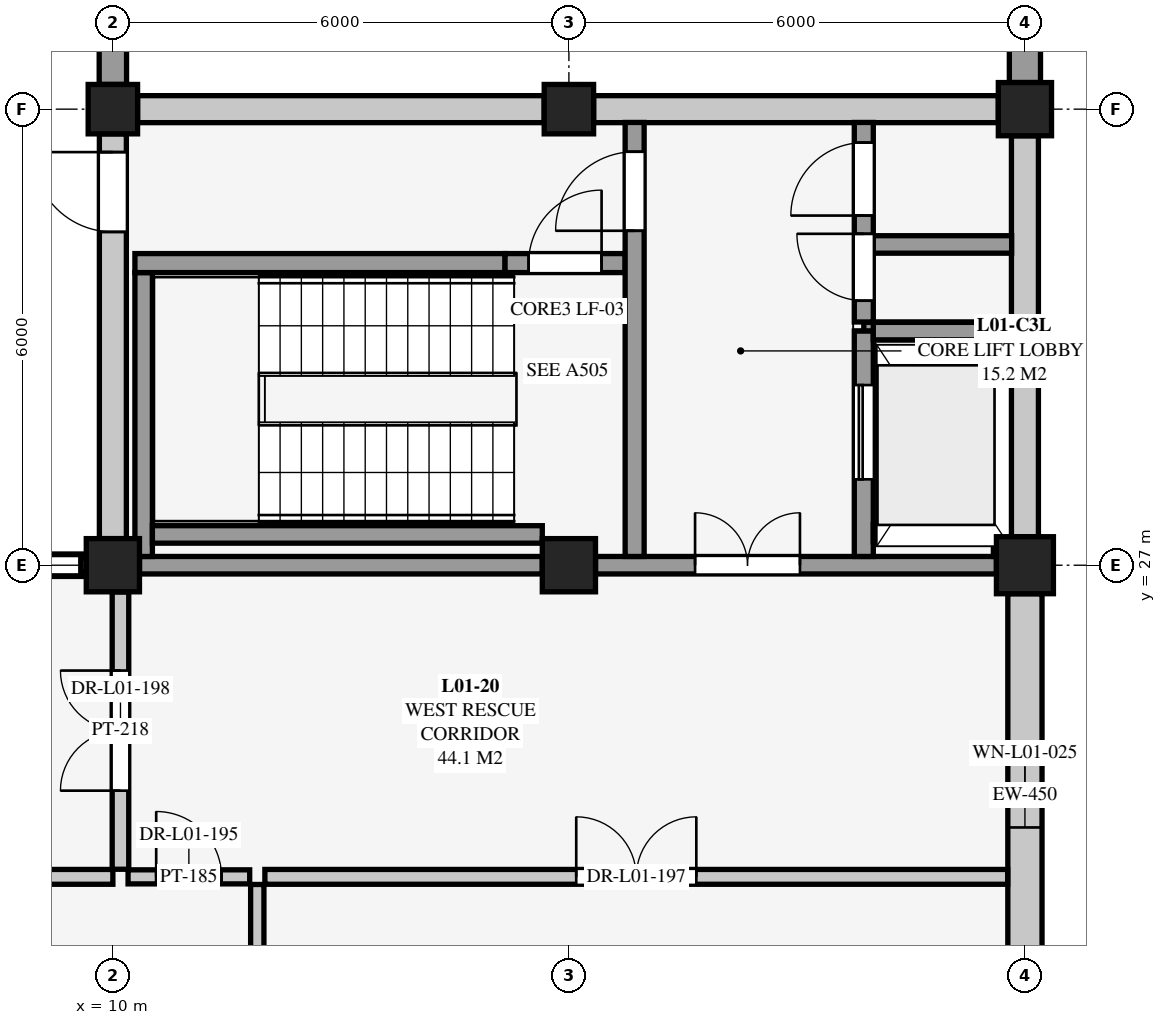
"""IFC4 building model, lengths in metres.
Left out: names, types, materials, properties, quantities, classifications, styles, units other than length and angle.
Written with IfcOpenShell. Run it as: python <this file> out.ifc"""

import sys

from ifc_helpers import new_model, si_unit, direction, frame, frame_2d, origin, origin_2d, place, context, subcontext, project, spatial, rectangle, extrude, element, fill, save


model = new_model("IFC4")
c1 = context("Model", 3, precision=1e-05, world=origin(), true_north=direction((0.0, 1.0)))
c2 = subcontext(c1, "Body", "Model", "MODEL_VIEW")
j1 = project(units=[si_unit("LENGTHUNIT", "METRE"), si_unit("PLANEANGLEUNIT", "RADIAN")], contexts=[c1])
p1 = place(None, origin())
s1 = spatial("IfcSite", under=j1, at=p1, CompositionType="ELEMENT")
p2 = place(p1, origin())
s2 = spatial("IfcBuilding", under=s1, at=p2, CompositionType="ELEMENT")
p3 = place(p2, origin())
s3 = spatial("IfcBuildingStorey", under=s2, at=p3, CompositionType="ELEMENT", Elevation=0.0)
p4 = place(p3, frame((10.0, 27.0, 0.0), z_axis=(0.0, 0.0, 1.0), x_axis=(1.0, 0.0, 0.0)))
e1 = element("IfcColumn", 1, at=p4, inside=s3, PredefinedType="COLUMN", context=c2, shape_type="SweptSolid", body=[
    extrude(rectangle(XDim=0.7, YDim=0.7, at=origin_2d()), origin(), (0.0, 0.0, 1.0), 4.5),
])
p5 = place(p3, frame((10.0, 33.0, 0.0), z_axis=(0.0, 0.0, 1.0), x_axis=(1.0, 0.0, 0.0)))
e2 = element("IfcColumn", 2, at=p5, inside=s3, PredefinedType="COLUMN", context=c2, shape_type="SweptSolid", body=[
    extrude(rectangle(XDim=0.65, YDim=0.65, at=origin_2d()), origin(), (0.0, 0.0, 1.0), 4.5),
])
p6 = place(p3, frame((16.0, 27.0, 0.0), z_axis=(0.0, 0.0, 1.0), x_axis=(1.0, 0.0, 0.0)))
e3 = element("IfcColumn", 3, at=p6, inside=s3, PredefinedType="COLUMN", context=c2, shape_type="SweptSolid", body=[
    extrude(rectangle(XDim=0.7, YDim=0.7, at=origin_2d()), origin(), (0.0, 0.0, 1.0), 4.5),
])
p7 = place(p3, frame((16.0, 33.0, 0.0), z_axis=(0.0, 0.0, 1.0), x_axis=(1.0, 0.0, 0.0)))
e4 = element("IfcColumn", 4, at=p7, inside=s3, PredefinedType="COLUMN", context=c2, shape_type="SweptSolid", body=[
    extrude(rectangle(XDim=0.65, YDim=0.65, at=origin_2d()), origin(), (0.0, 0.0, 1.0), 4.5),
])
p8 = place(p3, frame((22.0, 27.0, 0.0), z_axis=(0.0, 0.0, 1.0), x_axis=(1.0, 0.0, 0.0)))
e5 = element("IfcColumn", 5, at=p8, inside=s3, PredefinedType="COLUMN", context=c2, shape_type="SweptSolid", body=[
    extrude(rectangle(XDim=0.75, YDim=0.75, at=origin_2d()), origin(), (0.0, 0.0, 1.0), 4.5),
])
p9 = place(p3, frame((22.0, 33.0, 0.0), z_axis=(0.0, 0.0, 1.0), x_axis=(1.0, 0.0, 0.0)))
e6 = element("IfcColumn", 6, at=p9, inside=s3, PredefinedType="COLUMN", context=c2, shape_type="SweptSolid", body=[
    extrude(rectangle(XDim=0.7, YDim=0.7, at=origin_2d()), origin(), (0.0, 0.0, 1.0), 4.5),
])
p10 = place(p3, frame((10.0, 33.325, 0.0), z_axis=(0.0, 0.0, 1.0), x_axis=(0.0, 1.0, 0.0)))
e7 = element("IfcWall", 7, at=p10, inside=s3, PredefinedType="USERDEFINED", context=c2, shape_type="SweptSolid", body=[
    extrude(rectangle(XDim=5.275, YDim=0.36, at=frame_2d((2.638, 0.0))), origin(), (0.0, 0.0, 1.0), 4.5),
])
p11 = place(p3, frame((22.0, 33.35, 0.0), z_axis=(0.0, 0.0, 1.0), x_axis=(0.0, 1.0, 0.0)))
e8 = element("IfcWall", 8, at=p11, inside=s3, PredefinedType="USERDEFINED", context=c2, shape_type="SweptSolid", body=[
    extrude(rectangle(XDim=5.325, YDim=0.41, at=frame_2d((2.663, 0.0))), origin(), (0.0, 0.0, 1.0), 4.5),
])
p12 = place(p3, frame((4.4, 27.0, 0.0), z_axis=(0.0, 0.0, 1.0), x_axis=(1.0, 0.0, 0.0)))
e9 = element("IfcWall", 9, at=p12, inside=s3, PredefinedType="SOLIDWALL", context=c2, shape_type="SweptSolid", body=[
    extrude(rectangle(XDim=5.25, YDim=0.295, at=frame_2d((2.625, 0.0))), origin(), (0.0, 0.0, 1.0), 0.46),
])
p13 = place(p3, frame((22.0, 26.625, 0.0), z_axis=(0.0, 0.0, 1.0), x_axis=(0.0, -1.0, 0.0)))
e10 = element("IfcWall", 10, at=p13, inside=s3, PredefinedType="SOLIDWALL", context=c2, shape_type="SweptSolid", body=[
    extrude(rectangle(XDim=5.3, YDim=0.45, at=frame_2d((2.65, 0.0))), origin(), (0.0, 0.0, 1.0), 3.797),
])
p14 = place(p13, frame((2.225, 0.0, 0.9)))
e11 = element("IfcOpeningElement", 11, at=p14, cuts=e10, PredefinedType="OPENING", context=c2, shape_type="SweptSolid", body=[
    extrude(rectangle(XDim=0.85, YDim=1.95, at=frame_2d((0.425, 0.975))), frame((0.0, 0.235, 0.0), z_axis=(0.0, -1.0, 0.0), x_axis=(1.0, 0.0, 0.0)), (0.0, 0.0, 1.0), 0.47),
])
p15 = place(p3, frame((10.325, 33.0, 0.0), z_axis=(0.0, 0.0, 1.0), x_axis=(1.0, 0.0, 0.0)))
e12 = element("IfcWall", 12, at=p15, inside=s3, PredefinedType="SOLIDWALL", context=c2, shape_type="SweptSolid", body=[
    extrude(rectangle(XDim=5.35, YDim=0.355, at=frame_2d((2.675, 0.0))), origin(), (0.0, 0.0, 1.0), 3.918),
])
p16 = place(p3, frame((16.325, 33.0, 0.0), z_axis=(0.0, 0.0, 1.0), x_axis=(1.0, 0.0, 0.0)))
e13 = element("IfcWall", 13, at=p16, inside=s3, PredefinedType="SOLIDWALL", context=c2, shape_type="SweptSolid", body=[
    extrude(rectangle(XDim=5.325, YDim=0.355, at=frame_2d((2.663, 0.0))), origin(), (0.0, 0.0, 1.0), 3.757),
])
p17 = place(p3, frame((10.0, 27.35, 0.0), z_axis=(0.0, 0.0, 1.0), x_axis=(0.0, 1.0, 0.0)))
e14 = element("IfcWall", 14, at=p17, inside=s3, PredefinedType="SOLIDWALL", context=c2, shape_type="SweptSolid", body=[
    extrude(rectangle(XDim=5.325, YDim=0.355, at=frame_2d((2.663, 0.0))), origin(), (0.0, 0.0, 1.0), 3.763),
])
p18 = place(p17, frame((4.035, 0.0, 0.0)))
e15 = element("IfcOpeningElement", 15, at=p18, cuts=e14, PredefinedType="OPENING", context=c2, shape_type="SweptSolid", body=[
    extrude(rectangle(XDim=1.05, YDim=2.14, at=frame_2d((0.525, 1.07))), frame((0.0, 0.188, 0.0), z_axis=(0.0, -1.0, 0.0), x_axis=(1.0, 0.0, 0.0)), (0.0, 0.0, 1.0), 0.375),
])
p19 = place(p3, frame((22.0, 32.65, 0.0), z_axis=(0.0, 0.0, 1.0), x_axis=(0.0, -1.0, 0.0)))
e16 = element("IfcWall", 16, at=p19, inside=s3, PredefinedType="SOLIDWALL", context=c2, shape_type="SweptSolid", body=[
    extrude(rectangle(XDim=5.275, YDim=0.355, at=frame_2d((2.637, 0.0))), origin(), (0.0, 0.0, 1.0), 3.763),
])
p20 = place(p3, frame((19.88, 27.42, -1.05), z_axis=(0.0, 0.0, 1.0), x_axis=(1.0, 0.0, 0.0)))
e17 = element("IfcWall", 17, at=p20, inside=s3, PredefinedType="SHEAR", context=c2, shape_type="SweptSolid", body=[
    extrude(rectangle(XDim=1.82, YDim=0.23, at=frame_2d((0.91, 0.0))), origin(), (0.0, 0.0, 1.0), 1.05),
])
p21 = place(p3, frame((21.7, 27.42, -1.05), z_axis=(0.0, 0.0, 1.0), x_axis=(0.0, 1.0, 0.0)))
e18 = element("IfcWall", 18, at=p21, inside=s3, PredefinedType="SHEAR", context=c2, shape_type="SweptSolid", body=[
    extrude(rectangle(XDim=2.66, YDim=0.23, at=frame_2d((1.33, 0.0))), origin(), (0.0, 0.0, 1.0), 1.05),
])
p22 = place(p3, frame((21.7, 30.08, -1.05), z_axis=(0.0, 0.0, 1.0), x_axis=(-1.0, 0.0, 0.0)))
e19 = element("IfcWall", 19, at=p22, inside=s3, PredefinedType="SHEAR", context=c2, shape_type="SweptSolid", body=[
    extrude(rectangle(XDim=1.82, YDim=0.23, at=frame_2d((0.91, 0.0))), origin(), (0.0, 0.0, 1.0), 1.05),
])
p23 = place(p3, frame((19.88, 30.08, -1.05), z_axis=(0.0, 0.0, 1.0), x_axis=(0.0, -1.0, 0.0)))
e20 = element("IfcWall", 20, at=p23, inside=s3, PredefinedType="SHEAR", context=c2, shape_type="SweptSolid", body=[
    extrude(rectangle(XDim=2.66, YDim=0.23, at=frame_2d((1.33, 0.0))), origin(), (0.0, 0.0, 1.0), 1.05),
])
p24 = place(p3, frame((10.35, 27.0, 0.0), z_axis=(0.0, 0.0, 1.0), x_axis=(1.0, 0.0, 0.0)))
e21 = element("IfcWall", 21, at=p24, inside=s3, PredefinedType="SHEAR", context=c2, shape_type="SweptSolid", body=[
    extrude(rectangle(XDim=5.3, YDim=0.23, at=frame_2d((2.65, 0.0))), origin(), (0.0, 0.0, 1.0), 4.204),
])
p25 = place(p3, frame((16.35, 27.0, 0.0), z_axis=(0.0, 0.0, 1.0), x_axis=(1.0, 0.0, 0.0)))
e22 = element("IfcWall", 22, at=p25, inside=s3, PredefinedType="SHEAR", context=c2, shape_type="SweptSolid", body=[
    extrude(rectangle(XDim=5.275, YDim=0.23, at=frame_2d((2.637, 0.0))), origin(), (0.0, 0.0, 1.0), 4.204),
])
p26 = place(p25, frame((1.31, 0.0, 0.0)))
e23 = element("IfcOpeningElement", 23, at=p26, cuts=e22, PredefinedType="OPENING", context=c2, shape_type="SweptSolid", body=[
    extrude(rectangle(XDim=1.38, YDim=2.16, at=frame_2d((0.69, 1.08))), frame((0.0, 0.125, 0.0), z_axis=(0.0, -1.0, 0.0), x_axis=(1.0, 0.0, 0.0)), (0.0, 0.0, 1.0), 0.25),
])
p27 = place(p3, frame((10.405, 27.115, 0.0), z_axis=(0.0, 0.0, 1.0), x_axis=(0.0, 1.0, 0.0)))
e24 = element("IfcWall", 24, at=p27, inside=s3, PredefinedType="SHEAR", context=c2, shape_type="SweptSolid", body=[
    extrude(rectangle(XDim=3.735, YDim=0.23, at=frame_2d((1.868, 0.0))), origin(), (0.0, 0.0, 1.0), 4.5),
])
p28 = place(p3, frame((10.52, 27.405, 0.0), z_axis=(0.0, 0.0, 1.0), x_axis=(1.0, 0.0, 0.0)))
e25 = element("IfcWall", 25, at=p28, inside=s3, PredefinedType="SHEAR", context=c2, shape_type="SweptSolid", body=[
    extrude(rectangle(XDim=5.13, YDim=0.23, at=frame_2d((2.565, 0.0))), origin(), (0.0, 0.0, 1.0), 4.5),
])
p29 = place(p3, frame((10.29, 30.975, 0.0), z_axis=(0.0, 0.0, 1.0), x_axis=(1.0, 0.0, 0.0)))
e26 = element("IfcWall", 26, at=p29, inside=s3, PredefinedType="SHEAR", context=c2, shape_type="SweptSolid", body=[
    extrude(rectangle(XDim=4.87, YDim=0.25, at=frame_2d((2.435, 0.0))), origin(), (0.0, 0.0, 1.0), 4.5),
])
p30 = place(p3, frame((15.16, 30.975, 0.0), z_axis=(0.0, 0.0, 1.0), x_axis=(1.0, 0.0, 0.0)))
e27 = element("IfcWall", 27, at=p30, inside=s3, PredefinedType="SHEAR", context=c2, shape_type="SweptSolid", body=[
    extrude(rectangle(XDim=1.58, YDim=0.25, at=frame_2d((0.79, 0.0))), origin(), (0.0, 0.0, 1.0), 4.204),
])
p31 = place(p30, frame((0.31, 0.0, 0.0)))
e28 = element("IfcOpeningElement", 28, at=p31, cuts=e27, PredefinedType="OPENING", context=c2, shape_type="SweptSolid", body=[
    extrude(rectangle(XDim=0.96, YDim=2.12, at=frame_2d((0.48, 1.06))), frame((0.0, 0.135, 0.0), z_axis=(0.0, -1.0, 0.0), x_axis=(1.0, 0.0, 0.0)), (0.0, 0.0, 1.0), 0.27),
])
p32 = place(p3, frame((16.865, 27.115, 0.0), z_axis=(0.0, 0.0, 1.0), x_axis=(0.0, 1.0, 0.0)))
e29 = element("IfcWall", 29, at=p32, inside=s3, PredefinedType="SHEAR", context=c2, shape_type="SweptSolid", body=[
    extrude(rectangle(XDim=5.71, YDim=0.25, at=frame_2d((2.855, 0.0))), origin(), (0.0, 0.0, 1.0), 4.204),
])
p33 = place(p32, frame((4.285, 0.0, 0.0)))
e30 = element("IfcOpeningElement", 30, at=p33, cuts=e29, PredefinedType="OPENING", context=c2, shape_type="SweptSolid", body=[
    extrude(rectangle(XDim=1.04, YDim=2.14, at=frame_2d((0.52, 1.07))), frame((0.0, 0.135, 0.0), z_axis=(0.0, -1.0, 0.0), x_axis=(1.0, 0.0, 0.0)), (0.0, 0.0, 1.0), 0.27),
])
p34 = place(p3, frame((19.88, 27.115, 0.0), z_axis=(0.0, 0.0, 1.0), x_axis=(0.0, 1.0, 0.0)))
e31 = element("IfcWall", 31, at=p34, inside=s3, PredefinedType="SHEAR", context=c2, shape_type="SweptSolid", body=[
    extrude(rectangle(XDim=2.965, YDim=0.25, at=frame_2d((1.482, 0.0))), origin(), (0.0, 0.0, 1.0), 4.5),
])
p35 = place(p34, frame((1.015, 0.0, 0.0)))
e32 = element("IfcOpeningElement", 32, at=p35, cuts=e31, PredefinedType="OPENING", context=c2, shape_type="SweptSolid", body=[
    extrude(rectangle(XDim=1.24, YDim=2.2, at=frame_2d((0.62, 1.1))), frame((0.0, 0.135, 0.0), z_axis=(0.0, -1.0, 0.0), x_axis=(1.0, 0.0, 0.0)), (0.0, 0.0, 1.0), 0.27),
])
p36 = place(p3, frame((20.005, 27.42, 0.0), z_axis=(0.0, 0.0, 1.0), x_axis=(1.0, 0.0, 0.0)))
e33 = element("IfcWall", 33, at=p36, inside=s3, PredefinedType="SHEAR", context=c2, shape_type="SweptSolid", body=[
    extrude(rectangle(XDim=1.58, YDim=0.23, at=frame_2d((0.79, 0.0))), origin(), (0.0, 0.0, 1.0), 4.5),
])
p37 = place(p3, frame((21.7, 27.115, 0.0), z_axis=(0.0, 0.0, 1.0), x_axis=(0.0, 1.0, 0.0)))
e34 = element("IfcWall", 34, at=p37, inside=s3, PredefinedType="SHEAR", context=c2, shape_type="SweptSolid", body=[
    extrude(rectangle(XDim=2.965, YDim=0.23, at=frame_2d((1.482, 0.0))), origin(), (0.0, 0.0, 1.0), 4.5),
])
p38 = place(p3, frame((20.005, 30.08, 0.0), z_axis=(0.0, 0.0, 1.0), x_axis=(1.0, 0.0, 0.0)))
e35 = element("IfcWall", 35, at=p38, inside=s3, PredefinedType="SHEAR", context=c2, shape_type="SweptSolid", body=[
    extrude(rectangle(XDim=1.58, YDim=0.23, at=frame_2d((0.79, 0.0))), origin(), (0.0, 0.0, 1.0), 4.5),
])
p39 = place(p3, frame((19.88, 30.2, 0.0), z_axis=(0.0, 0.0, 1.0), x_axis=(0.0, 1.0, 0.0)))
e36 = element("IfcWall", 36, at=p39, inside=s3, PredefinedType="SHEAR", context=c2, shape_type="SweptSolid", body=[
    extrude(rectangle(XDim=2.625, YDim=0.25, at=frame_2d((1.312, 0.0))), origin(), (0.0, 0.0, 1.0), 4.204),
])
p40 = place(p39, frame((0.28, 0.0, 0.0)))
e37 = element("IfcOpeningElement", 37, at=p40, cuts=e36, PredefinedType="OPENING", context=c2, shape_type="SweptSolid", body=[
    extrude(rectangle(XDim=0.88, YDim=2.08, at=frame_2d((0.44, 1.04))), frame((0.0, 0.135, 0.0), z_axis=(0.0, -1.0, 0.0), x_axis=(1.0, 0.0, 0.0)), (0.0, 0.0, 1.0), 0.27),
])
p41 = place(p39, frame((1.4, 0.0, 0.0)))
e38 = element("IfcOpeningElement", 38, at=p41, cuts=e36, PredefinedType="OPENING", context=c2, shape_type="SweptSolid", body=[
    extrude(rectangle(XDim=0.96, YDim=2.12, at=frame_2d((0.48, 1.06))), frame((0.0, 0.135, 0.0), z_axis=(0.0, -1.0, 0.0), x_axis=(1.0, 0.0, 0.0)), (0.0, 0.0, 1.0), 0.27),
])
p42 = place(p3, frame((20.005, 31.22, 0.0), z_axis=(0.0, 0.0, 1.0), x_axis=(1.0, 0.0, 0.0)))
e39 = element("IfcWall", 39, at=p42, inside=s3, PredefinedType="SHEAR", context=c2, shape_type="SweptSolid", body=[
    extrude(rectangle(XDim=1.82, YDim=0.23, at=frame_2d((0.91, 0.0))), origin(), (0.0, 0.0, 1.0), 4.204),
])
p43 = place(p3, frame((11.9, 15.187, 0.0), z_axis=(0.0, 0.0, 1.0), x_axis=(0.0, 1.0, 0.0)))
e40 = element("IfcWall", 40, at=p43, inside=s3, PredefinedType="PARTITIONING", context=c2, shape_type="SweptSolid", body=[
    extrude(rectangle(XDim=7.613, YDim=0.175, at=frame_2d((3.807, 0.0))), origin(), (0.0, 0.0, 1.0), 4.216),
])
p44 = place(p43, frame((3.187, 0.0, 0.0)))
e41 = element("IfcOpeningElement", 41, at=p44, cuts=e40, PredefinedType="OPENING", context=c2, shape_type="SweptSolid", body=[
    extrude(rectangle(XDim=1.24, YDim=2.22, at=frame_2d((0.62, 1.11))), frame((0.0, 0.097, 0.0), z_axis=(0.0, -1.0, 0.0), x_axis=(1.0, 0.0, 0.0)), (0.0, 0.0, 1.0), 0.195),
])
p45 = place(p3, frame((10.2, 22.9, 0.0), z_axis=(0.0, 0.0, 1.0), x_axis=(1.0, 0.0, 0.0)))
e42 = element("IfcWall", 42, at=p45, inside=s3, PredefinedType="PARTITIONING", context=c2, shape_type="SweptSolid", body=[
    extrude(rectangle(XDim=1.6, YDim=0.185, at=frame_2d((0.8, 0.0))), origin(), (0.0, 0.0, 1.0), 4.216),
])
p46 = place(p45, frame((0.37, 0.0, 0.0)))
e43 = element("IfcOpeningElement", 43, at=p46, cuts=e42, PredefinedType="OPENING", context=c2, shape_type="SweptSolid", body=[
    extrude(rectangle(XDim=0.86, YDim=2.1, at=frame_2d((0.43, 1.05))), frame((0.0, 0.103, 0.0), z_axis=(0.0, -1.0, 0.0), x_axis=(1.0, 0.0, 0.0)), (0.0, 0.0, 1.0), 0.205),
])
p47 = place(p3, frame((4.217, 22.9, 0.0), z_axis=(0.0, 0.0, 1.0), x_axis=(1.0, 0.0, 0.0)))
e44 = element("IfcWall", 44, at=p47, inside=s3, PredefinedType="PARTITIONING", context=c2, shape_type="SweptSolid", body=[
    extrude(rectangle(XDim=5.783, YDim=0.195, at=frame_2d((2.892, 0.0))), origin(), (0.0, 0.0, 1.0), 4.216),
])
p48 = place(p47, frame((2.421, 0.0, 0.0)))
e45 = element("IfcOpeningElement", 45, at=p48, cuts=e44, PredefinedType="OPENING", context=c2, shape_type="SweptSolid", body=[
    extrude(rectangle(XDim=0.94, YDim=2.1, at=frame_2d((0.47, 1.05))), frame((0.0, 0.108, 0.0), z_axis=(0.0, -1.0, 0.0), x_axis=(1.0, 0.0, 0.0)), (0.0, 0.0, 1.0), 0.215),
])
p49 = place(p3, frame((12.0, 22.9, 0.0), z_axis=(0.0, 0.0, 1.0), x_axis=(1.0, 0.0, 0.0)))
e46 = element("IfcWall", 46, at=p49, inside=s3, PredefinedType="PARTITIONING", context=c2, shape_type="SweptSolid", body=[
    extrude(rectangle(XDim=9.773, YDim=0.195, at=frame_2d((4.886, 0.0))), origin(), (0.0, 0.0, 1.0), 4.216),
])
p50 = place(p49, frame((4.096, 0.0, 0.0)))
e47 = element("IfcOpeningElement", 47, at=p50, cuts=e46, PredefinedType="OPENING", context=c2, shape_type="SweptSolid", body=[
    extrude(rectangle(XDim=1.58, YDim=2.2, at=frame_2d((0.79, 1.1))), frame((0.0, 0.108, 0.0), z_axis=(0.0, -1.0, 0.0), x_axis=(1.0, 0.0, 0.0)), (0.0, 0.0, 1.0), 0.215),
])
p51 = place(p3, frame((10.1, 23.0, 0.0), z_axis=(0.0, 0.0, 1.0), x_axis=(0.0, 1.0, 0.0)))
e48 = element("IfcWall", 48, at=p51, inside=s3, PredefinedType="PARTITIONING", context=c2, shape_type="SweptSolid", body=[
    extrude(rectangle(XDim=3.648, YDim=0.218, at=frame_2d((1.824, 0.0))), origin(), (0.0, 0.0, 1.0), 4.216),
])
p52 = place(p51, frame((1.034, 0.0, 0.0)))
e49 = element("IfcOpeningElement", 49, at=p52, cuts=e48, PredefinedType="OPENING", context=c2, shape_type="SweptSolid", body=[
    extrude(rectangle(XDim=1.58, YDim=2.2, at=frame_2d((0.79, 1.1))), frame((0.0, 0.119, 0.0), z_axis=(0.0, -1.0, 0.0), x_axis=(1.0, 0.0, 0.0)), (0.0, 0.0, 1.0), 0.238),
])
p53 = place(p14, origin())
e50 = element("IfcWindow", 50, at=p53, inside=s3, PartitioningType="SINGLE_PANEL", PredefinedType="WINDOW", context=c2, shape_type="SweptSolid", body=[
    extrude(rectangle(XDim=0.85, YDim=1.95, at=frame_2d((0.425, 0.975))), frame((0.0, 0.03, 0.0), z_axis=(0.0, -1.0, 0.0), x_axis=(1.0, 0.0, 0.0)), (0.0, 0.0, 1.0), 0.06),
])
fill(e11, e50)
p54 = place(p18, origin())
e51 = element("IfcDoor", 51, at=p54, inside=s3, OperationType="SINGLE_SWING_RIGHT", PredefinedType="DOOR", context=c2, shape_type="SweptSolid", body=[
    extrude(rectangle(XDim=1.05, YDim=2.14, at=frame_2d((0.525, 1.07))), frame((0.0, 0.025, 0.0), z_axis=(0.0, -1.0, 0.0), x_axis=(1.0, 0.0, 0.0)), (0.0, 0.0, 1.0), 0.05),
])
fill(e15, e51)
p55 = place(p26, origin())
e52 = element("IfcDoor", 52, at=p55, inside=s3, OperationType="DOUBLE_DOOR_SINGLE_SWING", PredefinedType="DOOR", context=c2, shape_type="SweptSolid", body=[
    extrude(rectangle(XDim=1.38, YDim=2.16, at=frame_2d((0.69, 1.08))), frame((0.0, 0.025, 0.0), z_axis=(0.0, -1.0, 0.0), x_axis=(1.0, 0.0, 0.0)), (0.0, 0.0, 1.0), 0.05),
])
fill(e23, e52)
p56 = place(p31, origin())
e53 = element("IfcDoor", 53, at=p56, inside=s3, OperationType="SINGLE_SWING_RIGHT", PredefinedType="DOOR", context=c2, shape_type="SweptSolid", body=[
    extrude(rectangle(XDim=0.96, YDim=2.12, at=frame_2d((0.48, 1.06))), frame((0.0, 0.025, 0.0), z_axis=(0.0, -1.0, 0.0), x_axis=(1.0, 0.0, 0.0)), (0.0, 0.0, 1.0), 0.05),
])
fill(e28, e53)
p57 = place(p33, origin())
e54 = element("IfcDoor", 54, at=p57, inside=s3, OperationType="SINGLE_SWING_LEFT", PredefinedType="DOOR", context=c2, shape_type="SweptSolid", body=[
    extrude(rectangle(XDim=1.04, YDim=2.14, at=frame_2d((0.52, 1.07))), frame((0.0, 0.025, 0.0), z_axis=(0.0, -1.0, 0.0), x_axis=(1.0, 0.0, 0.0)), (0.0, 0.0, 1.0), 0.05),
])
fill(e30, e54)
p58 = place(p35, origin())
e55 = element("IfcDoor", 55, at=p58, inside=s3, OperationType="SLIDING_TO_LEFT", PredefinedType="DOOR", context=c2, shape_type="SweptSolid", body=[
    extrude(rectangle(XDim=1.24, YDim=2.2, at=frame_2d((0.62, 1.1))), frame((0.0, 0.025, 0.0), z_axis=(0.0, -1.0, 0.0), x_axis=(1.0, 0.0, 0.0)), (0.0, 0.0, 1.0), 0.05),
])
fill(e32, e55)
p59 = place(p40, origin())
e56 = element("IfcDoor", 56, at=p59, inside=s3, OperationType="SINGLE_SWING_RIGHT", PredefinedType="DOOR", context=c2, shape_type="SweptSolid", body=[
    extrude(rectangle(XDim=0.88, YDim=2.08, at=frame_2d((0.44, 1.04))), frame((0.0, 0.025, 0.0), z_axis=(0.0, -1.0, 0.0), x_axis=(1.0, 0.0, 0.0)), (0.0, 0.0, 1.0), 0.05),
])
fill(e37, e56)
p60 = place(p41, origin())
e57 = element("IfcDoor", 57, at=p60, inside=s3, OperationType="SINGLE_SWING_LEFT", PredefinedType="DOOR", context=c2, shape_type="SweptSolid", body=[
    extrude(rectangle(XDim=0.96, YDim=2.12, at=frame_2d((0.48, 1.06))), frame((0.0, 0.025, 0.0), z_axis=(0.0, -1.0, 0.0), x_axis=(1.0, 0.0, 0.0)), (0.0, 0.0, 1.0), 0.05),
])
fill(e38, e57)
p61 = place(p46, origin())
e58 = element("IfcDoor", 58, at=p61, inside=s3, OperationType="SINGLE_SWING_LEFT", PredefinedType="DOOR", context=c2, shape_type="SweptSolid", body=[
    extrude(rectangle(XDim=0.86, YDim=2.1, at=frame_2d((0.43, 1.05))), frame((0.0, 0.025, 0.0), z_axis=(0.0, -1.0, 0.0), x_axis=(1.0, 0.0, 0.0)), (0.0, 0.0, 1.0), 0.05),
])
fill(e43, e58)
p62 = place(p50, origin())
e59 = element("IfcDoor", 59, at=p62, inside=s3, OperationType="DOUBLE_DOOR_SINGLE_SWING", PredefinedType="DOOR", context=c2, shape_type="SweptSolid", body=[
    extrude(rectangle(XDim=1.58, YDim=2.2, at=frame_2d((0.79, 1.1))), frame((0.0, 0.025, 0.0), z_axis=(0.0, -1.0, 0.0), x_axis=(1.0, 0.0, 0.0)), (0.0, 0.0, 1.0), 0.05),
])
fill(e47, e59)
p63 = place(p52, origin())
e60 = element("IfcDoor", 60, at=p63, inside=s3, OperationType="DOUBLE_DOOR_SINGLE_SWING", PredefinedType="DOOR", context=c2, shape_type="SweptSolid", body=[
    extrude(rectangle(XDim=1.58, YDim=2.2, at=frame_2d((0.79, 1.1))), frame((0.0, 0.025, 0.0), z_axis=(0.0, -1.0, 0.0), x_axis=(1.0, 0.0, 0.0)), (0.0, 0.0, 1.0), 0.05),
])
fill(e49, e60)
save(model, sys.argv[1])
